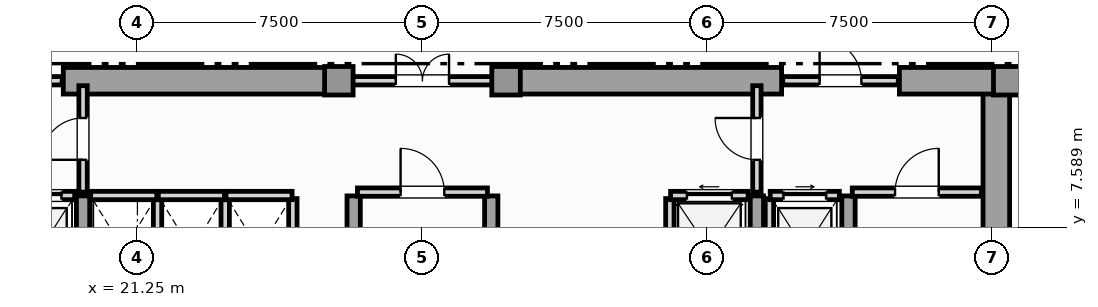
"""IFC4 building model, lengths in metres.
Left out: names, types, materials, properties, quantities, classifications, styles, units other than length and angle.
Written with IfcOpenShell. Run it as: python <this file> out.ifc"""

import sys

from ifc_helpers import new_model, si_unit, direction, frame, frame_2d, origin, origin_2d, place, context, subcontext, project, spatial, rectangle, extrude, element, fill, save


model = new_model("IFC4")
c1 = context("Model", 3, precision=1e-05, world=origin(), true_north=direction((0.0, 1.0)))
c2 = subcontext(c1, "Body", "Model", "MODEL_VIEW")
j1 = project(units=[si_unit("LENGTHUNIT", "METRE"), si_unit("PLANEANGLEUNIT", "RADIAN")], contexts=[c1])
p1 = place(None, origin())
s1 = spatial("IfcSite", under=j1, at=p1, CompositionType="ELEMENT")
p2 = place(p1, origin())
s2 = spatial("IfcBuilding", under=s1, at=p2, CompositionType="ELEMENT")
p3 = place(p2, frame((0.0, 0.0, 134.95)))
s3 = spatial("IfcBuildingStorey", under=s2, at=p3, CompositionType="ELEMENT", Elevation=134.95)
p4 = place(p3, frame((43.85, 0.92, 0.0), z_axis=(0.0, 0.0, 1.0), x_axis=(0.0, 1.0, 0.0)))
e1 = element("IfcWall", 1, at=p4, inside=s3, PredefinedType="SHEAR", context=c2, shape_type="SweptSolid", body=[
    extrude(rectangle(XDim=10.53, YDim=0.7, at=frame_2d((5.265, 0.0))), origin(), (0.0, 0.0, 1.0), 4.92),
])
for number, where, z_axis, x_axis in (
    (2, (19.3, 11.45, 0.0), (0.0, 0.0, 1.0), (1.0, 0.0, 0.0)),
    (3, (30.9, 11.45, 0.0), (0.0, 0.0, 1.0), (1.0, 0.0, 0.0)),
):
    element("IfcWall", number, at=place(p3, frame(where, z_axis=z_axis, x_axis=x_axis)), inside=s3, PredefinedType="SHEAR", context=c2, shape_type="SweptSolid", body=[
        extrude(rectangle(XDim=7.3, YDim=0.7, at=frame_2d((3.65, 0.0))), origin(), (0.0, 0.0, 1.0), 4.92),
    ])
p5 = place(p3, frame((41.3, 11.45, 0.0), z_axis=(0.0, 0.0, 1.0), x_axis=(1.0, 0.0, 0.0)))
e4 = element("IfcWall", 4, at=p5, inside=s3, PredefinedType="SHEAR", context=c2, shape_type="SweptSolid", body=[
    extrude(rectangle(XDim=2.95, YDim=0.7, at=frame_2d((1.475, 0.0))), origin(), (0.0, 0.0, 1.0), 4.92),
])
for number, where, z_axis, x_axis in (
    (5, (19.82, 0.92, 0.0), (0.0, 0.0, 1.0), (0.0, 1.0, 0.0)),
    (6, (26.94, 0.92, 0.0), (0.0, 0.0, 1.0), (0.0, 1.0, 0.0)),
    (7, (30.56, 0.92, 0.0), (0.0, 0.0, 1.0), (0.0, 1.0, 0.0)),
    (8, (37.55, 0.92, 0.0), (0.0, 0.0, 1.0), (0.0, 1.0, 0.0)),
    (9, (39.96, 0.92, 0.0), (0.0, 0.0, 1.0), (0.0, 1.0, 0.0)),
):
    element("IfcWall", number, at=place(p3, frame(where, z_axis=z_axis, x_axis=x_axis)), inside=s3, PredefinedType="SHEAR", context=c2, shape_type="SweptSolid", body=[
        extrude(rectangle(XDim=7.5, YDim=0.35, at=frame_2d((3.75, 0.0))), origin(), (0.0, 0.0, 1.0), 4.92),
    ])
for number, where, z_axis, x_axis in (
    (10, (44.15, 11.45, 0.0), (0.0, 0.0, 1.0), (1.0, 0.0, 0.0)),
    (11, (26.55, 11.45, 0.0), (0.0, 0.0, 1.0), (1.0, 0.0, 0.0)),
    (12, (30.95, 11.45, 0.0), (0.0, 0.0, 1.0), (1.0, 0.0, 0.0)),
):
    element("IfcColumn", number, at=place(p3, frame(where, z_axis=z_axis, x_axis=x_axis)), inside=s3, PredefinedType="COLUMN", context=c2, shape_type="SweptSolid", body=[
        extrude(rectangle(XDim=0.75, YDim=0.75, at=origin_2d()), origin(), (0.0, 0.0, 1.0), 5.2),
    ])
p6 = place(p3, frame((17.78, 8.43, 0.0), z_axis=(0.0, 0.0, 1.0), x_axis=(1.0, 0.0, 0.0)))
e13 = element("IfcWall", 13, at=p6, inside=s3, PredefinedType="SOLIDWALL", context=c2, shape_type="SweptSolid", body=[
    extrude(rectangle(XDim=1.82, YDim=0.22, at=frame_2d((0.91, 0.0))), origin(), (0.0, 0.0, 1.0), 4.92),
])
p7 = place(p6, frame((0.35, 0.0, 0.0)))
e14 = element("IfcOpeningElement", 14, at=p7, cuts=e13, PredefinedType="OPENING", context=c2, shape_type="SweptSolid", body=[
    extrude(rectangle(XDim=1.12, YDim=2.25, at=frame_2d((0.56, 1.125))), frame((0.0, 0.12, 0.0), z_axis=(0.0, -1.0, 0.0), x_axis=(1.0, 0.0, 0.0)), (0.0, 0.0, 1.0), 0.24),
])
p8 = place(p3, frame((37.88, 5.65, 0.0), z_axis=(0.0, 0.0, 1.0), x_axis=(0.0, 1.0, 0.0)))
e15 = element("IfcWall", 15, at=p8, inside=s3, PredefinedType="SOLIDWALL", context=c2, shape_type="SweptSolid", body=[
    extrude(rectangle(XDim=2.7, YDim=0.22, at=frame_2d((1.35, 0.0))), origin(), (0.0, 0.0, 1.0), 4.92),
])
p9 = place(p3, frame((37.9, 8.43, 0.0), z_axis=(0.0, 0.0, 1.0), x_axis=(1.0, 0.0, 0.0)))
e16 = element("IfcWall", 16, at=p9, inside=s3, PredefinedType="SOLIDWALL", context=c2, shape_type="SweptSolid", body=[
    extrude(rectangle(XDim=1.82, YDim=0.22, at=frame_2d((0.91, 0.0))), origin(), (0.0, 0.0, 1.0), 4.92),
])
p10 = place(p9, frame((0.35, 0.0, 0.0)))
e17 = element("IfcOpeningElement", 17, at=p10, cuts=e16, PredefinedType="OPENING", context=c2, shape_type="SweptSolid", body=[
    extrude(rectangle(XDim=1.12, YDim=2.25, at=frame_2d((0.56, 1.125))), frame((0.0, 0.12, 0.0), z_axis=(0.0, -1.0, 0.0), x_axis=(1.0, 0.0, 0.0)), (0.0, 0.0, 1.0), 0.24),
])
p11 = place(p3, frame((35.26, 5.65, 0.0), z_axis=(0.0, 0.0, 1.0), x_axis=(0.0, 1.0, 0.0)))
e18 = element("IfcWall", 18, at=p11, inside=s3, PredefinedType="SOLIDWALL", context=c2, shape_type="SweptSolid", body=[
    extrude(rectangle(XDim=2.7, YDim=0.22, at=frame_2d((1.35, 0.0))), origin(), (0.0, 0.0, 1.0), 4.92),
])
p12 = place(p3, frame((35.28, 8.43, 0.0), z_axis=(0.0, 0.0, 1.0), x_axis=(1.0, 0.0, 0.0)))
e19 = element("IfcWall", 19, at=p12, inside=s3, PredefinedType="SOLIDWALL", context=c2, shape_type="SweptSolid", body=[
    extrude(rectangle(XDim=2.04, YDim=0.22, at=frame_2d((1.02, 0.0))), origin(), (0.0, 0.0, 1.0), 4.92),
])
p13 = place(p12, frame((0.43, 0.0, 0.0)))
e20 = element("IfcOpeningElement", 20, at=p13, cuts=e19, PredefinedType="OPENING", context=c2, shape_type="SweptSolid", body=[
    extrude(rectangle(XDim=1.18, YDim=2.2, at=frame_2d((0.59, 1.1))), frame((0.0, 0.12, 0.0), z_axis=(0.0, -1.0, 0.0), x_axis=(1.0, 0.0, 0.0)), (0.0, 0.0, 1.0), 0.24),
])
p14 = place(p3, frame((21.78, 5.65, 0.0), z_axis=(0.0, 0.0, 1.0), x_axis=(0.0, 1.0, 0.0)))
e21 = element("IfcWall", 21, at=p14, inside=s3, PredefinedType="SOLIDWALL", context=c2, shape_type="SweptSolid", body=[
    extrude(rectangle(XDim=2.7, YDim=0.22, at=frame_2d((1.35, 0.0))), origin(), (0.0, 0.0, 1.0), 4.92),
])
p15 = place(p3, frame((20.02, 8.43, 0.0), z_axis=(0.0, 0.0, 1.0), x_axis=(1.0, 0.0, 0.0)))
e22 = element("IfcWall", 22, at=p15, inside=s3, PredefinedType="SOLIDWALL", context=c2, shape_type="SweptSolid", body=[
    extrude(rectangle(XDim=1.74, YDim=0.22, at=frame_2d((0.87, 0.0))), origin(), (0.0, 0.0, 1.0), 4.92),
])
p16 = place(p3, frame((23.56, 5.65, 0.0), z_axis=(0.0, 0.0, 1.0), x_axis=(0.0, 1.0, 0.0)))
e23 = element("IfcWall", 23, at=p16, inside=s3, PredefinedType="SOLIDWALL", context=c2, shape_type="SweptSolid", body=[
    extrude(rectangle(XDim=2.7, YDim=0.22, at=frame_2d((1.35, 0.0))), origin(), (0.0, 0.0, 1.0), 4.92),
])
p17 = place(p3, frame((21.8, 8.43, 0.0), z_axis=(0.0, 0.0, 1.0), x_axis=(1.0, 0.0, 0.0)))
e24 = element("IfcWall", 24, at=p17, inside=s3, PredefinedType="SOLIDWALL", context=c2, shape_type="SweptSolid", body=[
    extrude(rectangle(XDim=1.74, YDim=0.22, at=frame_2d((0.87, 0.0))), origin(), (0.0, 0.0, 1.0), 4.92),
])
p18 = place(p3, frame((25.34, 5.65, 0.0), z_axis=(0.0, 0.0, 1.0), x_axis=(0.0, 1.0, 0.0)))
e25 = element("IfcWall", 25, at=p18, inside=s3, PredefinedType="SOLIDWALL", context=c2, shape_type="SweptSolid", body=[
    extrude(rectangle(XDim=2.7, YDim=0.22, at=frame_2d((1.35, 0.0))), origin(), (0.0, 0.0, 1.0), 4.92),
])
p19 = place(p3, frame((23.58, 8.43, 0.0), z_axis=(0.0, 0.0, 1.0), x_axis=(1.0, 0.0, 0.0)))
e26 = element("IfcWall", 26, at=p19, inside=s3, PredefinedType="SOLIDWALL", context=c2, shape_type="SweptSolid", body=[
    extrude(rectangle(XDim=1.74, YDim=0.22, at=frame_2d((0.87, 0.0))), origin(), (0.0, 0.0, 1.0), 4.92),
])
p20 = place(p3, frame((40.06, 8.52, 0.0), z_axis=(0.0, 0.0, 1.0), x_axis=(1.0, 0.0, 0.0)))
e27 = element("IfcWall", 27, at=p20, inside=s3, PredefinedType="SOLIDWALL", context=c2, shape_type="SweptSolid", body=[
    extrude(rectangle(XDim=3.4, YDim=0.22, at=frame_2d((1.7, 0.0))), origin(), (0.0, 0.0, 1.0), 4.92),
])
p21 = place(p20, frame((1.125, 0.0, 0.0)))
e28 = element("IfcOpeningElement", 28, at=p21, cuts=e27, PredefinedType="OPENING", context=c2, shape_type="SweptSolid", body=[
    extrude(rectangle(XDim=1.15, YDim=2.2, at=frame_2d((0.575, 1.1))), frame((0.0, 0.12, 0.0), z_axis=(0.0, -1.0, 0.0), x_axis=(1.0, 0.0, 0.0)), (0.0, 0.0, 1.0), 0.24),
])
p22 = place(p3, frame((27.04, 8.52, 0.0), z_axis=(0.0, 0.0, 1.0), x_axis=(1.0, 0.0, 0.0)))
e29 = element("IfcWall", 29, at=p22, inside=s3, PredefinedType="SOLIDWALL", context=c2, shape_type="SweptSolid", body=[
    extrude(rectangle(XDim=3.42, YDim=0.22, at=frame_2d((1.71, 0.0))), origin(), (0.0, 0.0, 1.0), 4.92),
])
p23 = place(p22, frame((1.135, 0.0, 0.0)))
e30 = element("IfcOpeningElement", 30, at=p23, cuts=e29, PredefinedType="OPENING", context=c2, shape_type="SweptSolid", body=[
    extrude(rectangle(XDim=1.15, YDim=2.2, at=frame_2d((0.575, 1.1))), frame((0.0, 0.12, 0.0), z_axis=(0.0, -1.0, 0.0), x_axis=(1.0, 0.0, 0.0)), (0.0, 0.0, 1.0), 0.24),
])
p24 = place(p3, frame((19.82, 8.52, 0.0), z_axis=(0.0, 0.0, 1.0), x_axis=(0.0, 1.0, 0.0)))
e31 = element("IfcWall", 31, at=p24, inside=s3, PredefinedType="SOLIDWALL", context=c2, shape_type="SweptSolid", body=[
    extrude(rectangle(XDim=2.8, YDim=0.22, at=frame_2d((1.4, 0.0))), origin(), (0.0, 0.0, 1.0), 4.375),
])
p25 = place(p24, frame((0.85, 0.0, 0.0)))
e32 = element("IfcOpeningElement", 32, at=p25, cuts=e31, PredefinedType="OPENING", context=c2, shape_type="SweptSolid", body=[
    extrude(rectangle(XDim=1.1, YDim=2.2, at=frame_2d((0.55, 1.1))), frame((0.0, 0.12, 0.0), z_axis=(0.0, -1.0, 0.0), x_axis=(1.0, 0.0, 0.0)), (0.0, 0.0, 1.0), 0.24),
])
p26 = place(p3, frame((37.55, 8.52, 0.0), z_axis=(0.0, 0.0, 1.0), x_axis=(0.0, 1.0, 0.0)))
e33 = element("IfcWall", 33, at=p26, inside=s3, PredefinedType="SOLIDWALL", context=c2, shape_type="SweptSolid", body=[
    extrude(rectangle(XDim=2.8, YDim=0.22, at=frame_2d((1.4, 0.0))), origin(), (0.0, 0.0, 1.0), 4.375),
])
p27 = place(p26, frame((0.85, 0.0, 0.0)))
e34 = element("IfcOpeningElement", 34, at=p27, cuts=e33, PredefinedType="OPENING", context=c2, shape_type="SweptSolid", body=[
    extrude(rectangle(XDim=1.1, YDim=2.2, at=frame_2d((0.55, 1.1))), frame((0.0, 0.12, 0.0), z_axis=(0.0, -1.0, 0.0), x_axis=(1.0, 0.0, 0.0)), (0.0, 0.0, 1.0), 0.24),
])
p28 = place(p3, frame((16.23, 11.45, 0.0), z_axis=(0.0, 0.0, 1.0), x_axis=(1.0, 0.0, 0.0)))
e35 = element("IfcWall", 35, at=p28, inside=s3, PredefinedType="SOLIDWALL", context=c2, shape_type="SweptSolid", body=[
    extrude(rectangle(XDim=3.04, YDim=0.22, at=frame_2d((1.52, 0.0))), origin(), (0.0, 0.0, 1.0), 4.92),
])
p29 = place(p28, frame((0.97, 0.0, 0.0)))
e36 = element("IfcOpeningElement", 36, at=p29, cuts=e35, PredefinedType="OPENING", context=c2, shape_type="SweptSolid", body=[
    extrude(rectangle(XDim=1.1, YDim=2.2, at=frame_2d((0.55, 1.1))), frame((0.0, 0.12, 0.0), z_axis=(0.0, -1.0, 0.0), x_axis=(1.0, 0.0, 0.0)), (0.0, 0.0, 1.0), 0.24),
])
p30 = place(p3, frame((26.63, 11.45, 0.0), z_axis=(0.0, 0.0, 1.0), x_axis=(1.0, 0.0, 0.0)))
e37 = element("IfcWall", 37, at=p30, inside=s3, PredefinedType="SOLIDWALL", context=c2, shape_type="SweptSolid", body=[
    extrude(rectangle(XDim=4.24, YDim=0.22, at=frame_2d((2.12, 0.0))), origin(), (0.0, 0.0, 1.0), 4.92),
])
p31 = place(p30, frame((1.42, 0.0, 0.0)))
e38 = element("IfcOpeningElement", 38, at=p31, cuts=e37, PredefinedType="OPENING", context=c2, shape_type="SweptSolid", body=[
    extrude(rectangle(XDim=1.4, YDim=2.2, at=frame_2d((0.7, 1.1))), frame((0.0, 0.12, 0.0), z_axis=(0.0, -1.0, 0.0), x_axis=(1.0, 0.0, 0.0)), (0.0, 0.0, 1.0), 0.24),
])
p32 = place(p3, frame((38.23, 11.45, 0.0), z_axis=(0.0, 0.0, 1.0), x_axis=(1.0, 0.0, 0.0)))
e39 = element("IfcWall", 39, at=p32, inside=s3, PredefinedType="SOLIDWALL", context=c2, shape_type="SweptSolid", body=[
    extrude(rectangle(XDim=3.04, YDim=0.22, at=frame_2d((1.52, 0.0))), origin(), (0.0, 0.0, 1.0), 4.92),
])
p33 = place(p32, frame((0.97, 0.0, 0.0)))
e40 = element("IfcOpeningElement", 40, at=p33, cuts=e39, PredefinedType="OPENING", context=c2, shape_type="SweptSolid", body=[
    extrude(rectangle(XDim=1.1, YDim=2.2, at=frame_2d((0.55, 1.1))), frame((0.0, 0.12, 0.0), z_axis=(0.0, -1.0, 0.0), x_axis=(1.0, 0.0, 0.0)), (0.0, 0.0, 1.0), 0.24),
])
p34 = place(p7, origin())
e41 = element("IfcDoor", 41, at=p34, inside=s3, OperationType="SLIDING_TO_LEFT", PredefinedType="DOOR", context=c2, shape_type="SweptSolid", body=[
    extrude(rectangle(XDim=1.12, YDim=2.25, at=frame_2d((0.56, 1.125))), frame((0.0, 0.025, 0.0), z_axis=(0.0, -1.0, 0.0), x_axis=(1.0, 0.0, 0.0)), (0.0, 0.0, 1.0), 0.05),
])
fill(e14, e41)
p35 = place(p10, origin())
e42 = element("IfcDoor", 42, at=p35, inside=s3, OperationType="SLIDING_TO_RIGHT", PredefinedType="DOOR", context=c2, shape_type="SweptSolid", body=[
    extrude(rectangle(XDim=1.12, YDim=2.25, at=frame_2d((0.56, 1.125))), frame((0.0, 0.025, 0.0), z_axis=(0.0, -1.0, 0.0), x_axis=(1.0, 0.0, 0.0)), (0.0, 0.0, 1.0), 0.05),
])
fill(e17, e42)
p36 = place(p13, origin())
e43 = element("IfcDoor", 43, at=p36, inside=s3, OperationType="SLIDING_TO_LEFT", PredefinedType="DOOR", context=c2, shape_type="SweptSolid", body=[
    extrude(rectangle(XDim=1.18, YDim=2.2, at=frame_2d((0.59, 1.1))), frame((0.0, 0.025, 0.0), z_axis=(0.0, -1.0, 0.0), x_axis=(1.0, 0.0, 0.0)), (0.0, 0.0, 1.0), 0.05),
])
fill(e20, e43)
p37 = place(p21, origin())
e44 = element("IfcDoor", 44, at=p37, inside=s3, OperationType="SINGLE_SWING_RIGHT", PredefinedType="DOOR", context=c2, shape_type="SweptSolid", body=[
    extrude(rectangle(XDim=1.15, YDim=2.2, at=frame_2d((0.575, 1.1))), frame((0.0, 0.025, 0.0), z_axis=(0.0, -1.0, 0.0), x_axis=(1.0, 0.0, 0.0)), (0.0, 0.0, 1.0), 0.05),
])
fill(e28, e44)
p38 = place(p23, origin())
e45 = element("IfcDoor", 45, at=p38, inside=s3, OperationType="SINGLE_SWING_LEFT", PredefinedType="DOOR", context=c2, shape_type="SweptSolid", body=[
    extrude(rectangle(XDim=1.15, YDim=2.2, at=frame_2d((0.575, 1.1))), frame((0.0, 0.025, 0.0), z_axis=(0.0, -1.0, 0.0), x_axis=(1.0, 0.0, 0.0)), (0.0, 0.0, 1.0), 0.05),
])
fill(e30, e45)
p39 = place(p25, origin())
e46 = element("IfcDoor", 46, at=p39, inside=s3, OperationType="SINGLE_SWING_LEFT", PredefinedType="DOOR", context=c2, shape_type="SweptSolid", body=[
    extrude(rectangle(XDim=1.1, YDim=2.2, at=frame_2d((0.55, 1.1))), frame((0.0, 0.025, 0.0), z_axis=(0.0, -1.0, 0.0), x_axis=(1.0, 0.0, 0.0)), (0.0, 0.0, 1.0), 0.05),
])
fill(e32, e46)
p40 = place(p27, origin())
e47 = element("IfcDoor", 47, at=p40, inside=s3, OperationType="SINGLE_SWING_RIGHT", PredefinedType="DOOR", context=c2, shape_type="SweptSolid", body=[
    extrude(rectangle(XDim=1.1, YDim=2.2, at=frame_2d((0.55, 1.1))), frame((0.0, 0.025, 0.0), z_axis=(0.0, -1.0, 0.0), x_axis=(1.0, 0.0, 0.0)), (0.0, 0.0, 1.0), 0.05),
])
fill(e34, e47)
p41 = place(p31, origin())
e48 = element("IfcDoor", 48, at=p41, inside=s3, OperationType="DOUBLE_DOOR_SINGLE_SWING", PredefinedType="DOOR", context=c2, shape_type="SweptSolid", body=[
    extrude(rectangle(XDim=1.4, YDim=2.2, at=frame_2d((0.7, 1.1))), frame((0.0, 0.025, 0.0), z_axis=(0.0, -1.0, 0.0), x_axis=(1.0, 0.0, 0.0)), (0.0, 0.0, 1.0), 0.05),
])
fill(e38, e48)
p42 = place(p33, origin())
e49 = element("IfcDoor", 49, at=p42, inside=s3, OperationType="SINGLE_SWING_LEFT", PredefinedType="DOOR", context=c2, shape_type="SweptSolid", body=[
    extrude(rectangle(XDim=1.1, YDim=2.2, at=frame_2d((0.55, 1.1))), frame((0.0, 0.025, 0.0), z_axis=(0.0, -1.0, 0.0), x_axis=(1.0, 0.0, 0.0)), (0.0, 0.0, 1.0), 0.05),
])
fill(e40, e49)
save(model, sys.argv[1])
